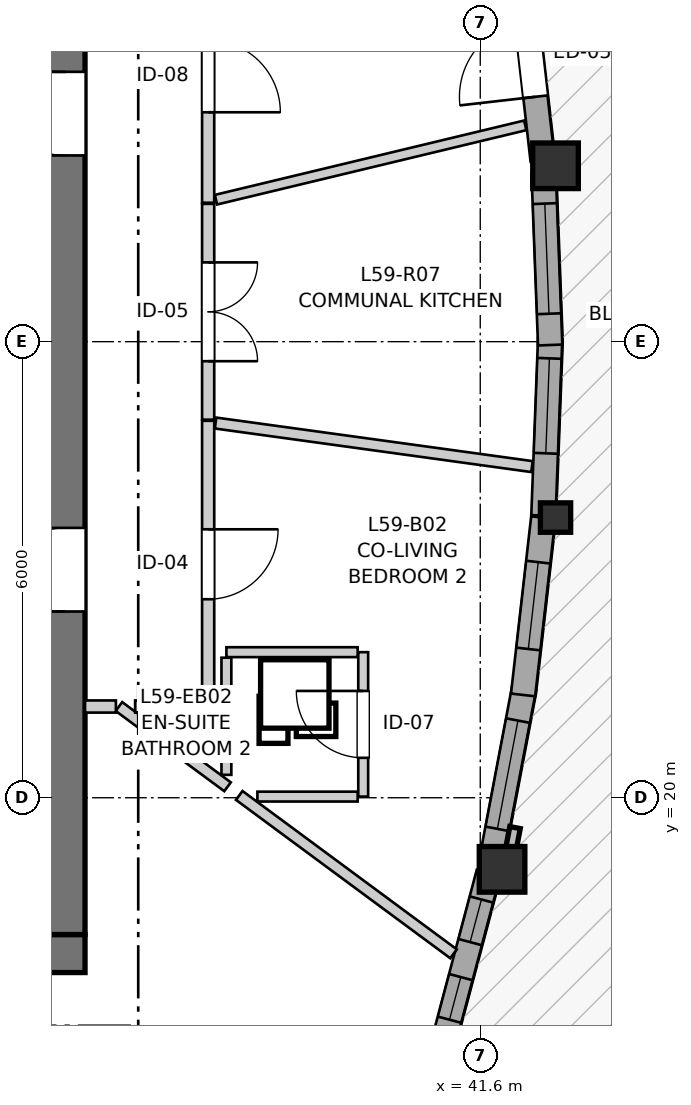
"""IFC4 building model, lengths in metres.
Left out: names, types, materials, properties, quantities, classifications, styles, units other than length and angle.
Written with IfcOpenShell. Run it as: python <this file> out.ifc"""

import sys

from ifc_helpers import new_model, si_unit, direction, frame, frame_2d, origin, origin_2d, place, context, subcontext, project, spatial, rectangle, i_section, extrude, source, transform, mapped, element, fill, save


model = new_model("IFC4")
c1 = context("Model", 3, precision=1e-05, world=origin(), true_north=direction((0.0, 1.0)))
c2 = subcontext(c1, "Body", "Model", "MODEL_VIEW")
j1 = project(units=[si_unit("LENGTHUNIT", "METRE"), si_unit("PLANEANGLEUNIT", "RADIAN")], contexts=[c1])
p1 = place(None, origin())
s1 = spatial("IfcSite", under=j1, at=p1, CompositionType="ELEMENT")
p2 = place(p1, origin())
s2 = spatial("IfcBuilding", under=s1, at=p2, CompositionType="ELEMENT")
p3 = place(p2, frame((0.0, 0.0, 198.8)))
s3 = spatial("IfcBuildingStorey", under=s2, at=p3, CompositionType="ELEMENT", Elevation=198.8)
p4 = place(p3, frame((24.3, 17.95, 0.0), z_axis=(0.0, 0.0, 1.0), x_axis=(1.0, 0.0, 0.0)))
e1 = element("IfcWall", 1, at=p4, inside=s3, PredefinedType="SHEAR", context=c2, shape_type="SweptSolid", body=[
    extrude(rectangle(XDim=12.1, YDim=0.5, at=frame_2d((6.05, 0.0))), origin(), (0.0, 0.0, 1.0), 2.96),
])
p5 = place(p3, frame((36.15, 18.2, 0.0), z_axis=(0.0, 0.0, 1.0), x_axis=(0.0, 1.0, 0.0)))
e2 = element("IfcWall", 2, at=p5, inside=s3, PredefinedType="SHEAR", context=c2, shape_type="SweptSolid", body=[
    extrude(rectangle(XDim=15.6, YDim=0.5, at=frame_2d((7.8, 0.0))), origin(), (0.0, 0.0, 1.0), 2.96),
])
p6 = place(p5, frame((4.25, 0.0, 0.0)))
e3 = element("IfcOpeningElement", 3, at=p6, cuts=e2, PredefinedType="OPENING", context=c2, shape_type="SweptSolid", body=[
    extrude(rectangle(XDim=1.1, YDim=2.15, at=frame_2d((0.55, 1.075))), frame((0.0, 0.26, 0.0), z_axis=(0.0, -1.0, 0.0), x_axis=(1.0, 0.0, 0.0)), (0.0, 0.0, 1.0), 0.52),
])
p7 = place(p5, frame((10.25, 0.0, 0.0)))
e4 = element("IfcOpeningElement", 4, at=p7, cuts=e2, PredefinedType="OPENING", context=c2, shape_type="SweptSolid", body=[
    extrude(rectangle(XDim=1.1, YDim=2.15, at=frame_2d((0.55, 1.075))), frame((0.0, 0.26, 0.0), z_axis=(0.0, -1.0, 0.0), x_axis=(1.0, 0.0, 0.0)), (0.0, 0.0, 1.0), 0.52),
])
m1 = source(origin(), c2, "Body", "SweptSolid", [
    extrude(rectangle(XDim=0.6, YDim=0.6, at=origin_2d()), origin(), (0.0, 0.0, 1.0), 2.96),
])
p8 = place(p3, frame((41.887, 19.058, 0.0), z_axis=(0.0, 0.0, 1.0), x_axis=(1.0, 0.0, 0.0)))
e5 = element("IfcColumn", 5, at=p8, inside=s3, PredefinedType="COLUMN", context=c2, shape_type="MappedRepresentation", body=[
    mapped(m1, transform((0.0, 0.0, 0.0), x_axis=(1.0, 0.0, 0.0), y_axis=(0.0, 1.0, 0.0), z_axis=(0.0, 0.0, 1.0), scale=1.0)),
])
m2 = source(origin(), c2, "Body", "SweptSolid", [
    extrude(i_section(OverallWidth=0.398, OverallDepth=0.387, WebThickness=0.019, FlangeThickness=0.03, FilletRadius=0.015, at=origin_2d()), origin(), (0.0, 0.0, 1.0), 2.96),
])
p9 = place(p3, frame((42.59, 23.686, 0.0), z_axis=(0.0, 0.0, 1.0), x_axis=(1.0, 0.0, 0.0)))
e6 = element("IfcColumn", 6, at=p9, inside=s3, PredefinedType="PILASTER", context=c2, shape_type="MappedRepresentation", body=[
    mapped(m2, transform((0.0, 0.0, 0.0), x_axis=(1.0, 0.0, 0.0), y_axis=(0.0, 1.0, 0.0), z_axis=(0.0, 0.0, 1.0), scale=1.0)),
])
p10 = place(p3, frame((42.59, 28.314, 0.0), z_axis=(0.0, 0.0, 1.0), x_axis=(1.0, 0.0, 0.0)))
e7 = element("IfcColumn", 7, at=p10, inside=s3, PredefinedType="COLUMN", context=c2, shape_type="MappedRepresentation", body=[
    mapped(m1, transform((0.0, 0.0, 0.0), x_axis=(1.0, 0.0, 0.0), y_axis=(0.0, 1.0, 0.0), z_axis=(0.0, 0.0, 1.0), scale=1.0)),
])
p11 = place(p3, frame((41.107, 16.748, 0.0), z_axis=(0.0, 0.0, 1.0), x_axis=(0.257000958827, 0.966411148095, 0.0)))
e8 = element("IfcWall", 8, at=p11, inside=s3, PredefinedType="SOLIDWALL", context=c2, shape_type="SweptSolid", body=[
    extrude(rectangle(XDim=2.343, YDim=0.32, at=frame_2d((1.171, 0.0))), origin(), (0.0, 0.0, 1.0), 2.58),
])
p12 = place(p11, frame((0.343, 0.0, 0.82)))
e9 = element("IfcOpeningElement", 9, at=p12, cuts=e8, PredefinedType="OPENING", context=c2, shape_type="SweptSolid", body=[
    extrude(rectangle(XDim=0.58, YDim=1.35, at=frame_2d((0.29, 0.675))), frame((0.0, 0.17, 0.0), z_axis=(0.0, -1.0, 0.0), x_axis=(1.0, 0.0, 0.0)), (0.0, 0.0, 1.0), 0.34),
])
p13 = place(p11, frame((1.399, 0.0, 0.82)))
e10 = element("IfcOpeningElement", 10, at=p13, cuts=e8, PredefinedType="OPENING", context=c2, shape_type="SweptSolid", body=[
    extrude(rectangle(XDim=0.58, YDim=1.35, at=frame_2d((0.29, 0.675))), frame((0.0, 0.17, 0.0), z_axis=(0.0, -1.0, 0.0), x_axis=(1.0, 0.0, 0.0)), (0.0, 0.0, 1.0), 0.34),
])
p14 = place(p3, frame((41.747, 19.176, 0.0), z_axis=(0.0, 0.0, 1.0), x_axis=(0.186649393072, 0.982426589657, 0.0)))
e11 = element("IfcWall", 11, at=p14, inside=s3, PredefinedType="SOLIDWALL", context=c2, shape_type="SweptSolid", body=[
    extrude(rectangle(XDim=2.303, YDim=0.32, at=frame_2d((1.152, 0.0))), origin(), (0.0, 0.0, 1.0), 2.58),
])
p15 = place(p14, frame((0.422, 0.0, 0.82)))
e12 = element("IfcOpeningElement", 12, at=p15, cuts=e11, PredefinedType="OPENING", context=c2, shape_type="SweptSolid", body=[
    extrude(rectangle(XDim=1.45, YDim=1.25, at=frame_2d((0.725, 0.625))), frame((0.0, 0.17, 0.0), z_axis=(0.0, -1.0, 0.0), x_axis=(1.0, 0.0, 0.0)), (0.0, 0.0, 1.0), 0.34),
])
p16 = place(p3, frame((42.163, 21.352, 0.0), z_axis=(0.0, 0.0, 1.0), x_axis=(0.113273764078, 0.993563814947, 0.0)))
e13 = element("IfcWall", 13, at=p16, inside=s3, PredefinedType="SOLIDWALL", context=c2, shape_type="SweptSolid", body=[
    extrude(rectangle(XDim=2.347, YDim=0.32, at=frame_2d((1.174, 0.0))), origin(), (0.0, 0.0, 1.0), 2.58),
])
p17 = place(p16, frame((0.608, 0.0, 0.82)))
e14 = element("IfcOpeningElement", 14, at=p17, cuts=e13, PredefinedType="OPENING", context=c2, shape_type="SweptSolid", body=[
    extrude(rectangle(XDim=1.15, YDim=1.2, at=frame_2d((0.575, 0.6))), frame((0.0, 0.17, 0.0), z_axis=(0.0, -1.0, 0.0), x_axis=(1.0, 0.0, 0.0)), (0.0, 0.0, 1.0), 0.34),
])
p18 = place(p3, frame((42.431, 23.712, 0.0), z_axis=(0.0, 0.0, 1.0), x_axis=(0.037979071107, 0.999278534823, 0.0)))
e15 = element("IfcWall", 15, at=p18, inside=s3, PredefinedType="SOLIDWALL", context=c2, shape_type="SweptSolid", body=[
    extrude(rectangle(XDim=2.333, YDim=0.32, at=frame_2d((1.167, 0.0))), origin(), (0.0, 0.0, 1.0), 2.58),
])
p19 = place(p18, frame((0.82, 0.0, 0.82)))
e16 = element("IfcOpeningElement", 16, at=p19, cuts=e15, PredefinedType="OPENING", context=c2, shape_type="SweptSolid", body=[
    extrude(rectangle(XDim=1.25, YDim=1.35, at=frame_2d((0.625, 0.675))), frame((0.0, 0.17, 0.0), z_axis=(0.0, -1.0, 0.0), x_axis=(1.0, 0.0, 0.0)), (0.0, 0.0, 1.0), 0.34),
])
p20 = place(p3, frame((42.52, 25.956, 0.0), z_axis=(0.0, 0.0, 1.0), x_axis=(-0.038072753844, 0.999274969873, 0.0)))
e17 = element("IfcWall", 17, at=p20, inside=s3, PredefinedType="SOLIDWALL", context=c2, shape_type="SweptSolid", body=[
    extrude(rectangle(XDim=2.264, YDim=0.32, at=frame_2d((1.132, 0.0))), origin(), (0.0, 0.0, 1.0), 2.58),
])
p21 = place(p20, frame((0.412, 0.0, 0.82)))
e18 = element("IfcOpeningElement", 18, at=p21, cuts=e17, PredefinedType="OPENING", context=c2, shape_type="SweptSolid", body=[
    extrude(rectangle(XDim=1.45, YDim=1.25, at=frame_2d((0.725, 0.625))), frame((0.0, 0.17, 0.0), z_axis=(0.0, -1.0, 0.0), x_axis=(1.0, 0.0, 0.0)), (0.0, 0.0, 1.0), 0.34),
])
p22 = place(p3, frame((42.421, 28.385, 0.0), z_axis=(0.0, 0.0, 1.0), x_axis=(-0.113220012761, 0.993569941529, 0.0)))
e19 = element("IfcWall", 19, at=p22, inside=s3, PredefinedType="SOLIDWALL", context=c2, shape_type="SweptSolid", body=[
    extrude(rectangle(XDim=2.277, YDim=0.32, at=frame_2d((1.139, 0.0))), origin(), (0.0, 0.0, 1.0), 2.58),
])
p23 = place(p22, frame((0.842, 0.0, 0.0)))
e20 = element("IfcOpeningElement", 20, at=p23, cuts=e19, PredefinedType="OPENING", context=c2, shape_type="SweptSolid", body=[
    extrude(rectangle(XDim=1.0, YDim=2.1, at=frame_2d((0.5, 1.05))), frame((0.0, 0.17, 0.0), z_axis=(0.0, -1.0, 0.0), x_axis=(1.0, 0.0, 0.0)), (0.0, 0.0, 1.0), 0.34),
])
p24 = place(p3, frame((38.02, 24.959, 0.0), z_axis=(0.0, 0.0, 1.0), x_axis=(0.0, -1.0, 0.0)))
e21 = element("IfcWall", 21, at=p24, inside=s3, PredefinedType="PARTITIONING", context=c2, shape_type="SweptSolid", body=[
    extrude(rectangle(XDim=3.759, YDim=0.16, at=frame_2d((1.879, 0.0))), origin(), (0.0, 0.0, 1.0), 2.96),
])
p25 = place(p24, frame((1.427, 0.0, 0.0)))
e22 = element("IfcOpeningElement", 22, at=p25, cuts=e21, PredefinedType="OPENING", context=c2, shape_type="SweptSolid", body=[
    extrude(rectangle(XDim=0.92, YDim=2.1, at=frame_2d((0.46, 1.05))), frame((0.0, 0.09, 0.0), z_axis=(0.0, -1.0, 0.0), x_axis=(1.0, 0.0, 0.0)), (0.0, 0.0, 1.0), 0.18),
])
p26 = place(p3, frame((38.02, 31.161, 0.0), z_axis=(0.0, 0.0, 1.0), x_axis=(0.0, -1.0, 0.0)))
e23 = element("IfcWall", 23, at=p26, inside=s3, PredefinedType="PARTITIONING", context=c2, shape_type="SweptSolid", body=[
    extrude(rectangle(XDim=3.333, YDim=0.16, at=frame_2d((1.667, 0.0))), origin(), (0.0, 0.0, 1.0), 2.628),
])
p27 = place(p26, frame((1.193, 0.0, 0.0)))
e24 = element("IfcOpeningElement", 24, at=p27, cuts=e23, PredefinedType="OPENING", context=c2, shape_type="SweptSolid", body=[
    extrude(rectangle(XDim=0.95, YDim=2.1, at=frame_2d((0.475, 1.05))), frame((0.0, 0.09, 0.0), z_axis=(0.0, -1.0, 0.0), x_axis=(1.0, 0.0, 0.0)), (0.0, 0.0, 1.0), 0.18),
])
p28 = place(p3, frame((38.02, 27.813, 0.0), z_axis=(0.0, 0.0, 1.0), x_axis=(0.0, -1.0, 0.0)))
e25 = element("IfcWall", 25, at=p28, inside=s3, PredefinedType="PARTITIONING", context=c2, shape_type="SweptSolid", body=[
    extrude(rectangle(XDim=2.839, YDim=0.16, at=frame_2d((1.419, 0.0))), origin(), (0.0, 0.0, 1.0), 2.96),
])
p29 = place(p28, frame((0.77, 0.0, 0.0)))
e26 = element("IfcOpeningElement", 26, at=p29, cuts=e25, PredefinedType="OPENING", context=c2, shape_type="SweptSolid", body=[
    extrude(rectangle(XDim=1.3, YDim=2.1, at=frame_2d((0.65, 1.05))), frame((0.0, 0.09, 0.0), z_axis=(0.0, -1.0, 0.0), x_axis=(1.0, 0.0, 0.0)), (0.0, 0.0, 1.0), 0.18),
])
p30 = place(p3, frame((40.06, 20.015, 0.0), z_axis=(0.0, 0.0, 1.0), x_axis=(0.0, 1.0, 0.0)))
e27 = element("IfcWall", 27, at=p30, inside=s3, PredefinedType="PARTITIONING", context=c2, shape_type="SweptSolid", body=[
    extrude(rectangle(XDim=1.9, YDim=0.13, at=frame_2d((0.95, 0.0))), origin(), (0.0, 0.0, 1.0), 2.598),
])
p31 = place(p30, frame((0.51, 0.0, 0.0)))
e28 = element("IfcOpeningElement", 28, at=p31, cuts=e27, PredefinedType="OPENING", context=c2, shape_type="SweptSolid", body=[
    extrude(rectangle(XDim=0.88, YDim=2.05, at=frame_2d((0.44, 1.025))), frame((0.0, 0.075, 0.0), z_axis=(0.0, -1.0, 0.0), x_axis=(1.0, 0.0, 0.0)), (0.0, 0.0, 1.0), 0.15),
])
p32 = place(p3, frame((38.118, 24.929, 0.0), z_axis=(0.0, 0.0, 1.0), x_axis=(0.990658246077, -0.136368029533, 0.0)))
e29 = element("IfcWall", 29, at=p32, inside=s3, PredefinedType="PARTITIONING", context=c2, shape_type="SweptSolid", body=[
    extrude(rectangle(XDim=4.202, YDim=0.145, at=frame_2d((2.101, 0.0))), origin(), (0.0, 0.0, 1.0), 2.96),
])
p33 = place(p3, frame((38.123, 27.868, 0.0), z_axis=(0.0, 0.0, 1.0), x_axis=(0.972302502293, 0.233726002051, 0.0)))
e30 = element("IfcWall", 30, at=p33, inside=s3, PredefinedType="PARTITIONING", context=c2, shape_type="SweptSolid", body=[
    extrude(rectangle(XDim=4.185, YDim=0.13, at=frame_2d((2.092, 0.0))), origin(), (0.0, 0.0, 1.0), 2.96),
])
p34 = place(p3, frame((38.429, 20.03, 0.0), z_axis=(0.0, 0.0, 1.0), x_axis=(0.804249944798, -0.594291196546, 0.0)))
e31 = element("IfcWall", 31, at=p34, inside=s3, PredefinedType="PARTITIONING", context=c2, shape_type="SweptSolid", body=[
    extrude(rectangle(XDim=3.506, YDim=0.145, at=frame_2d((1.753, 0.0))), origin(), (0.0, 0.0, 1.0), 2.96),
])
p35 = place(p3, frame((38.26, 21.915, 0.0), z_axis=(0.0, 0.0, 1.0), x_axis=(1.0, 0.0, 0.0)))
e32 = element("IfcWall", 32, at=p35, inside=s3, PredefinedType="PARTITIONING", context=c2, shape_type="SweptSolid", body=[
    extrude(rectangle(XDim=1.727, YDim=0.13, at=frame_2d((0.864, 0.0))), origin(), (0.0, 0.0, 1.0), 2.96),
])
p36 = place(p3, frame((36.846, 21.2, 0.0), z_axis=(0.0, 0.0, 1.0), x_axis=(0.804250382672, -0.594290603974, 0.0)))
e33 = element("IfcWall", 33, at=p36, inside=s3, PredefinedType="PARTITIONING", context=c2, shape_type="SweptSolid", body=[
    extrude(rectangle(XDim=1.777, YDim=0.145, at=frame_2d((0.888, 0.0))), origin(), (0.0, 0.0, 1.0), 2.96),
])
p37 = place(p3, frame((38.26, 20.301, 0.0), z_axis=(0.0, 0.0, 1.0), x_axis=(0.0, 1.0, 0.0)))
e34 = element("IfcWall", 34, at=p37, inside=s3, PredefinedType="PARTITIONING", context=c2, shape_type="SweptSolid", body=[
    extrude(rectangle(XDim=1.541, YDim=0.13, at=frame_2d((0.771, 0.0))), origin(), (0.0, 0.0, 1.0), 2.628),
])
p38 = place(p3, frame((38.668, 20.015, 0.0), z_axis=(0.0, 0.0, 1.0), x_axis=(1.0, 0.0, 0.0)))
e35 = element("IfcWall", 35, at=p38, inside=s3, PredefinedType="PARTITIONING", context=c2, shape_type="SweptSolid", body=[
    extrude(rectangle(XDim=1.319, YDim=0.13, at=frame_2d((0.66, 0.0))), origin(), (0.0, 0.0, 1.0), 2.96),
])
p39 = place(p3, frame((37.059, 21.2, 0.0), z_axis=(0.0, 0.0, 1.0), x_axis=(1.0, 0.0, 0.0)))
e36 = element("IfcWall", 36, at=p39, inside=s3, PredefinedType="PARTITIONING", context=c2, shape_type="SweptSolid", body=[
    extrude(rectangle(XDim=0.873, YDim=0.16, at=frame_2d((0.437, 0.0))), origin(), (0.0, 0.0, 1.0), 2.96),
])
p40 = place(p3, frame((36.4, 21.2, 0.0), z_axis=(0.0, 0.0, 1.0), x_axis=(1.0, 0.0, 0.0)))
e37 = element("IfcWall", 37, at=p40, inside=s3, PredefinedType="PARTITIONING", context=c2, shape_type="SweptSolid", body=[
    extrude(rectangle(XDim=0.406, YDim=0.16, at=frame_2d((0.203, 0.0))), origin(), (0.0, 0.0, 1.0), 2.96),
])
m3 = source(origin(), c2, "Body", "SweptSolid", [
    extrude(rectangle(XDim=0.58, YDim=1.35, at=frame_2d((0.29, 0.675))), frame((0.0, 0.03, 0.0), z_axis=(0.0, -1.0, 0.0), x_axis=(1.0, 0.0, 0.0)), (0.0, 0.0, 1.0), 0.06),
])
p41 = place(p12, origin())
e38 = element("IfcWindow", 38, at=p41, inside=s3, PartitioningType="SINGLE_PANEL", PredefinedType="WINDOW", context=c2, shape_type="MappedRepresentation", body=[
    mapped(m3, transform((0.0, 0.0, 0.0), x_axis=(1.0, 0.0, 0.0), y_axis=(0.0, 1.0, 0.0), z_axis=(0.0, 0.0, 1.0), scale=1.0)),
])
fill(e9, e38)
p42 = place(p13, origin())
e39 = element("IfcWindow", 39, at=p42, inside=s3, PartitioningType="SINGLE_PANEL", PredefinedType="WINDOW", context=c2, shape_type="MappedRepresentation", body=[
    mapped(m3, transform((0.0, 0.0, 0.0), x_axis=(1.0, 0.0, 0.0), y_axis=(0.0, 1.0, 0.0), z_axis=(0.0, 0.0, 1.0), scale=1.0)),
])
fill(e10, e39)
m4 = source(origin(), c2, "Body", "SweptSolid", [
    extrude(rectangle(XDim=1.45, YDim=1.25, at=frame_2d((0.725, 0.625))), frame((0.0, 0.03, 0.0), z_axis=(0.0, -1.0, 0.0), x_axis=(1.0, 0.0, 0.0)), (0.0, 0.0, 1.0), 0.06),
])
p43 = place(p15, origin())
e40 = element("IfcWindow", 40, at=p43, inside=s3, PartitioningType="SINGLE_PANEL", PredefinedType="WINDOW", context=c2, shape_type="MappedRepresentation", body=[
    mapped(m4, transform((0.0, 0.0, 0.0), x_axis=(1.0, 0.0, 0.0), y_axis=(0.0, 1.0, 0.0), z_axis=(0.0, 0.0, 1.0), scale=1.0)),
])
fill(e12, e40)
m5 = source(origin(), c2, "Body", "SweptSolid", [
    extrude(rectangle(XDim=1.15, YDim=1.2, at=frame_2d((0.575, 0.6))), frame((0.0, 0.03, 0.0), z_axis=(0.0, -1.0, 0.0), x_axis=(1.0, 0.0, 0.0)), (0.0, 0.0, 1.0), 0.06),
])
p44 = place(p17, origin())
e41 = element("IfcWindow", 41, at=p44, inside=s3, PartitioningType="SINGLE_PANEL", PredefinedType="WINDOW", context=c2, shape_type="MappedRepresentation", body=[
    mapped(m5, transform((0.0, 0.0, 0.0), x_axis=(1.0, 0.0, 0.0), y_axis=(0.0, 1.0, 0.0), z_axis=(0.0, 0.0, 1.0), scale=1.0)),
])
fill(e14, e41)
m6 = source(origin(), c2, "Body", "SweptSolid", [
    extrude(rectangle(XDim=1.25, YDim=1.35, at=frame_2d((0.625, 0.675))), frame((0.0, 0.03, 0.0), z_axis=(0.0, -1.0, 0.0), x_axis=(1.0, 0.0, 0.0)), (0.0, 0.0, 1.0), 0.06),
])
p45 = place(p19, origin())
e42 = element("IfcWindow", 42, at=p45, inside=s3, PartitioningType="SINGLE_PANEL", PredefinedType="WINDOW", context=c2, shape_type="MappedRepresentation", body=[
    mapped(m6, transform((0.0, 0.0, 0.0), x_axis=(1.0, 0.0, 0.0), y_axis=(0.0, 1.0, 0.0), z_axis=(0.0, 0.0, 1.0), scale=1.0)),
])
fill(e16, e42)
p46 = place(p21, origin())
e43 = element("IfcWindow", 43, at=p46, inside=s3, PartitioningType="SINGLE_PANEL", PredefinedType="WINDOW", context=c2, shape_type="MappedRepresentation", body=[
    mapped(m4, transform((0.0, 0.0, 0.0), x_axis=(1.0, 0.0, 0.0), y_axis=(0.0, 1.0, 0.0), z_axis=(0.0, 0.0, 1.0), scale=1.0)),
])
fill(e18, e43)
m7 = source(origin(), c2, "Body", "SweptSolid", [
    extrude(rectangle(XDim=1.0, YDim=2.1, at=frame_2d((0.5, 1.05))), frame((0.0, 0.025, 0.0), z_axis=(0.0, -1.0, 0.0), x_axis=(1.0, 0.0, 0.0)), (0.0, 0.0, 1.0), 0.05),
])
p47 = place(p23, origin())
e44 = element("IfcDoor", 44, at=p47, inside=s3, OperationType="SINGLE_SWING_LEFT", PredefinedType="DOOR", context=c2, shape_type="MappedRepresentation", body=[
    mapped(m7, transform((0.0, 0.0, 0.0), x_axis=(1.0, 0.0, 0.0), y_axis=(0.0, 1.0, 0.0), z_axis=(0.0, 0.0, 1.0), scale=1.0)),
])
fill(e20, e44)
m8 = source(origin(), c2, "Body", "SweptSolid", [
    extrude(rectangle(XDim=1.1, YDim=2.15, at=frame_2d((0.55, 1.075))), frame((0.0, 0.025, 0.0), z_axis=(0.0, -1.0, 0.0), x_axis=(1.0, 0.0, 0.0)), (0.0, 0.0, 1.0), 0.05),
])
p48 = place(p6, origin())
e45 = element("IfcDoor", 45, at=p48, inside=s3, OperationType="SINGLE_SWING_LEFT", PredefinedType="DOOR", context=c2, shape_type="MappedRepresentation", body=[
    mapped(m8, transform((0.0, 0.0, 0.0), x_axis=(1.0, 0.0, 0.0), y_axis=(0.0, 1.0, 0.0), z_axis=(0.0, 0.0, 1.0), scale=1.0)),
])
fill(e3, e45)
p49 = place(p7, origin())
e46 = element("IfcDoor", 46, at=p49, inside=s3, OperationType="SINGLE_SWING_RIGHT", PredefinedType="DOOR", context=c2, shape_type="MappedRepresentation", body=[
    mapped(m8, transform((0.0, 0.0, 0.0), x_axis=(1.0, 0.0, 0.0), y_axis=(0.0, 1.0, 0.0), z_axis=(0.0, 0.0, 1.0), scale=1.0)),
])
fill(e4, e46)
m9 = source(origin(), c2, "Body", "SweptSolid", [
    extrude(rectangle(XDim=0.92, YDim=2.1, at=frame_2d((0.46, 1.05))), frame((0.0, 0.025, 0.0), z_axis=(0.0, -1.0, 0.0), x_axis=(1.0, 0.0, 0.0)), (0.0, 0.0, 1.0), 0.05),
])
p50 = place(p25, origin())
e47 = element("IfcDoor", 47, at=p50, inside=s3, OperationType="SINGLE_SWING_LEFT", PredefinedType="DOOR", context=c2, shape_type="MappedRepresentation", body=[
    mapped(m9, transform((0.0, 0.0, 0.0), x_axis=(1.0, 0.0, 0.0), y_axis=(0.0, 1.0, 0.0), z_axis=(0.0, 0.0, 1.0), scale=1.0)),
])
fill(e22, e47)
m10 = source(origin(), c2, "Body", "SweptSolid", [
    extrude(rectangle(XDim=0.95, YDim=2.1, at=frame_2d((0.475, 1.05))), frame((0.0, 0.025, 0.0), z_axis=(0.0, -1.0, 0.0), x_axis=(1.0, 0.0, 0.0)), (0.0, 0.0, 1.0), 0.05),
])
p51 = place(p27, origin())
e48 = element("IfcDoor", 48, at=p51, inside=s3, OperationType="SINGLE_SWING_RIGHT", PredefinedType="DOOR", context=c2, shape_type="MappedRepresentation", body=[
    mapped(m10, transform((0.0, 0.0, 0.0), x_axis=(1.0, 0.0, 0.0), y_axis=(0.0, 1.0, 0.0), z_axis=(0.0, 0.0, 1.0), scale=1.0)),
])
fill(e24, e48)
m11 = source(origin(), c2, "Body", "SweptSolid", [
    extrude(rectangle(XDim=1.3, YDim=2.1, at=frame_2d((0.65, 1.05))), frame((0.0, 0.025, 0.0), z_axis=(0.0, -1.0, 0.0), x_axis=(1.0, 0.0, 0.0)), (0.0, 0.0, 1.0), 0.05),
])
p52 = place(p29, origin())
e49 = element("IfcDoor", 49, at=p52, inside=s3, OperationType="DOUBLE_DOOR_SINGLE_SWING", PredefinedType="DOOR", context=c2, shape_type="MappedRepresentation", body=[
    mapped(m11, transform((0.0, 0.0, 0.0), x_axis=(1.0, 0.0, 0.0), y_axis=(0.0, 1.0, 0.0), z_axis=(0.0, 0.0, 1.0), scale=1.0)),
])
fill(e26, e49)
m12 = source(origin(), c2, "Body", "SweptSolid", [
    extrude(rectangle(XDim=0.88, YDim=2.05, at=frame_2d((0.44, 1.025))), frame((0.0, 0.025, 0.0), z_axis=(0.0, -1.0, 0.0), x_axis=(1.0, 0.0, 0.0)), (0.0, 0.0, 1.0), 0.05),
])
p53 = place(p31, origin())
e50 = element("IfcDoor", 50, at=p53, inside=s3, OperationType="SINGLE_SWING_RIGHT", PredefinedType="DOOR", context=c2, shape_type="MappedRepresentation", body=[
    mapped(m12, transform((0.0, 0.0, 0.0), x_axis=(1.0, 0.0, 0.0), y_axis=(0.0, 1.0, 0.0), z_axis=(0.0, 0.0, 1.0), scale=1.0)),
])
fill(e28, e50)
save(model, sys.argv[1])
